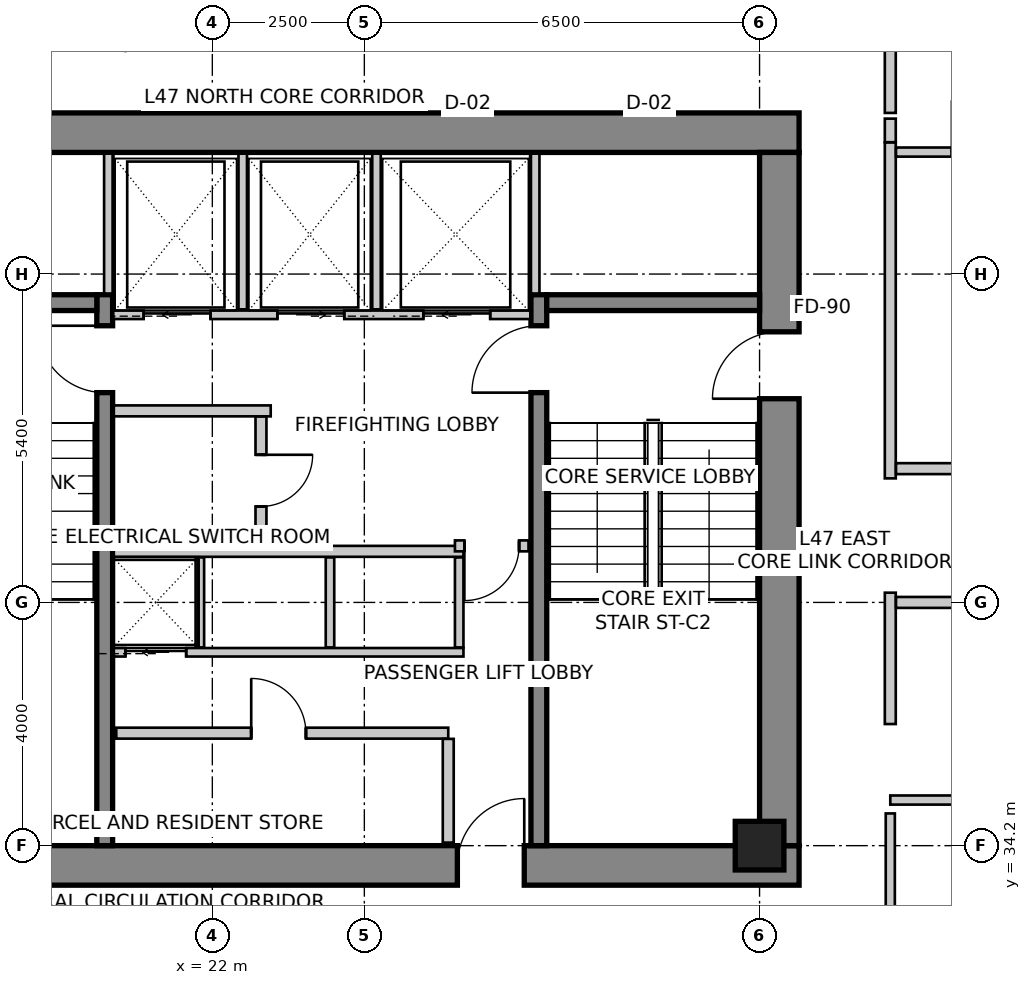
"""IFC4 building model, lengths in metres.
Left out: names, types, materials, properties, quantities, classifications, styles, units other than length and angle.
Written with IfcOpenShell. Run it as: python <this file> out.ifc"""

import sys

from ifc_helpers import new_model, si_unit, direction, frame, frame_2d, origin, origin_2d, place, context, subcontext, project, spatial, rectangle, extrude, source, transform, mapped, element, fill, save


model = new_model("IFC4")
c1 = context("Model", 3, precision=1e-05, world=origin(), true_north=direction((0.0, 1.0)))
c2 = subcontext(c1, "Body", "Model", "MODEL_VIEW")
j1 = project(units=[si_unit("LENGTHUNIT", "METRE"), si_unit("PLANEANGLEUNIT", "RADIAN")], contexts=[c1])
p1 = place(None, origin())
s1 = spatial("IfcSite", under=j1, at=p1, CompositionType="ELEMENT")
p2 = place(p1, origin())
s2 = spatial("IfcBuilding", under=s1, at=p2, CompositionType="ELEMENT")
p3 = place(p2, frame((0.0, 0.0, 190.4)))
s3 = spatial("IfcBuildingStorey", under=s2, at=p3, CompositionType="ELEMENT", Elevation=190.4)
p4 = place(p3, frame((15.95, 45.925, 0.0), z_axis=(0.0, 0.0, 1.0), x_axis=(1.0, 0.0, 0.0)))
e1 = element("IfcWall", 1, at=p4, inside=s3, PredefinedType="SHEAR", context=c2, shape_type="SweptSolid", body=[
    extrude(rectangle(XDim=15.7, YDim=0.65, at=frame_2d((7.85, 0.0))), origin(), (0.0, 0.0, 1.0), 3.5),
])
p5 = place(p3, frame((15.95, 33.875, 0.0), z_axis=(0.0, 0.0, 1.0), x_axis=(1.0, 0.0, 0.0)))
e2 = element("IfcWall", 2, at=p5, inside=s3, PredefinedType="SHEAR", context=c2, shape_type="SweptSolid", body=[
    extrude(rectangle(XDim=15.7, YDim=0.65, at=frame_2d((7.85, 0.0))), origin(), (0.0, 0.0, 1.0), 3.5),
])
m1 = source(origin(), c2, "Body", "SweptSolid", [
    extrude(rectangle(XDim=1.1, YDim=2.15, at=frame_2d((0.55, 1.075))), frame((0.0, 0.335, 0.0), z_axis=(0.0, -1.0, 0.0), x_axis=(1.0, 0.0, 0.0)), (0.0, 0.0, 1.0), 0.67),
])
p6 = place(p5, frame((10.08, 0.0, 0.0)))
e3 = element("IfcOpeningElement", 3, at=p6, cuts=e2, PredefinedType="OPENING", context=c2, shape_type="MappedRepresentation", body=[
    mapped(m1, transform((0.0, 0.0, 0.0), scale=1.0)),
])
p7 = place(p3, frame((31.325, 34.2, 0.0), z_axis=(0.0, 0.0, 1.0), x_axis=(0.0, 1.0, 0.0)))
e4 = element("IfcWall", 4, at=p7, inside=s3, PredefinedType="SHEAR", context=c2, shape_type="SweptSolid", body=[
    extrude(rectangle(XDim=11.4, YDim=0.65, at=frame_2d((5.7, 0.0))), origin(), (0.0, 0.0, 1.0), 3.5),
])
p8 = place(p7, frame((7.35, 0.0, 0.0)))
e5 = element("IfcOpeningElement", 5, at=p8, cuts=e4, PredefinedType="OPENING", context=c2, shape_type="MappedRepresentation", body=[
    mapped(m1, transform((0.0, 0.0, 0.0), scale=1.0)),
])
p9 = place(p3, frame((20.23, 34.2, 0.0), z_axis=(0.0, 0.0, 1.0), x_axis=(0.0, 1.0, 0.0)))
e6 = element("IfcWall", 6, at=p9, inside=s3, PredefinedType="SHEAR", context=c2, shape_type="SweptSolid", body=[
    extrude(rectangle(XDim=9.06, YDim=0.26, at=frame_2d((4.53, 0.0))), origin(), (0.0, 0.0, 1.0), 3.5),
])
m2 = source(origin(), c2, "Body", "SweptSolid", [
    extrude(rectangle(XDim=1.1, YDim=2.15, at=frame_2d((0.55, 1.075))), frame((0.0, 0.14, 0.0), z_axis=(0.0, -1.0, 0.0), x_axis=(1.0, 0.0, 0.0)), (0.0, 0.0, 1.0), 0.28),
])
p10 = place(p9, frame((7.45, 0.0, 0.0)))
e7 = element("IfcOpeningElement", 7, at=p10, cuts=e6, PredefinedType="OPENING", context=c2, shape_type="MappedRepresentation", body=[
    mapped(m2, transform((0.0, 0.0, 0.0), scale=1.0)),
])
p11 = place(p3, frame((27.37, 34.2, 0.0), z_axis=(0.0, 0.0, 1.0), x_axis=(0.0, 1.0, 0.0)))
e8 = element("IfcWall", 8, at=p11, inside=s3, PredefinedType="SHEAR", context=c2, shape_type="SweptSolid", body=[
    extrude(rectangle(XDim=9.06, YDim=0.26, at=frame_2d((4.53, 0.0))), origin(), (0.0, 0.0, 1.0), 3.5),
])
p12 = place(p11, frame((7.45, 0.0, 0.0)))
e9 = element("IfcOpeningElement", 9, at=p12, cuts=e8, PredefinedType="OPENING", context=c2, shape_type="MappedRepresentation", body=[
    mapped(m2, transform((0.0, 0.0, 0.0), scale=1.0)),
])
for number, where, z_axis, x_axis in (
    (10, (16.6, 43.13, 0.0), (0.0, 0.0, 1.0), (1.0, 0.0, 0.0)),
    (11, (27.5, 43.13, 0.0), (0.0, 0.0, 1.0), (1.0, 0.0, 0.0)),
):
    element("IfcWall", number, at=place(p3, frame(where, z_axis=z_axis, x_axis=x_axis)), inside=s3, PredefinedType="SHEAR", context=c2, shape_type="SweptSolid", body=[
        extrude(rectangle(XDim=3.5, YDim=0.26, at=frame_2d((1.75, 0.0))), origin(), (0.0, 0.0, 1.0), 3.5),
    ])
m3 = source(origin(), c2, "Body", "SweptSolid", [
    extrude(rectangle(XDim=0.8, YDim=0.8, at=origin_2d()), origin(), (0.0, 0.0, 1.0), 3.5),
])
p13 = place(p3, frame((31.0, 34.2, 0.0), z_axis=(0.0, 0.0, 1.0), x_axis=(1.0, 0.0, 0.0)))
e12 = element("IfcColumn", 12, at=p13, inside=s3, PredefinedType="COLUMN", context=c2, shape_type="MappedRepresentation", body=[
    mapped(m3, transform((0.0, 0.0, 0.0), scale=1.0)),
])
p14 = place(p3, frame((21.875, 52.742, 0.0), z_axis=(0.0, 0.0, 1.0), x_axis=(-0.843666375448, -0.536867811419, 0.0)))
e13 = element("IfcWall", 13, at=p14, inside=s3, PredefinedType="SOLIDWALL", context=c2, shape_type="SweptSolid", body=[
    extrude(rectangle(XDim=10.284, YDim=0.3, at=frame_2d((5.142, 0.0))), origin(), (0.0, 0.0, 1.0), 3.25),
])
m4 = source(origin(), c2, "Body", "SweptSolid", [
    extrude(rectangle(XDim=2.4, YDim=2.2, at=frame_2d((1.2, 1.1))), frame((0.0, 0.16, 0.0), z_axis=(0.0, -1.0, 0.0), x_axis=(1.0, 0.0, 0.0)), (0.0, 0.0, 1.0), 0.32),
])
p15 = place(p14, frame((3.307, 0.0, 0.85)))
e14 = element("IfcOpeningElement", 14, at=p15, cuts=e13, PredefinedType="OPENING", context=c2, shape_type="MappedRepresentation", body=[
    mapped(m4, transform((0.0, 0.0, 0.0), scale=1.0)),
])
p16 = place(p3, frame((20.37, 42.93, 0.0), z_axis=(0.0, 0.0, 1.0), x_axis=(1.0, 0.0, 0.0)))
e15 = element("IfcWall", 15, at=p16, inside=s3, PredefinedType="SOLIDWALL", context=c2, shape_type="SweptSolid", body=[
    extrude(rectangle(XDim=6.86, YDim=0.14, at=frame_2d((3.43, 0.0))), origin(), (0.0, 0.0, 1.0), 3.25),
])
m5 = source(origin(), c2, "Body", "SweptSolid", [
    extrude(rectangle(XDim=1.1, YDim=2.15, at=frame_2d((0.55, 1.075))), frame((0.0, 0.08, 0.0), z_axis=(0.0, -1.0, 0.0), x_axis=(1.0, 0.0, 0.0)), (0.0, 0.0, 1.0), 0.16),
])
p17 = place(p16, frame((0.5, 0.0, 0.0)))
e16 = element("IfcOpeningElement", 16, at=p17, cuts=e15, PredefinedType="OPENING", context=c2, shape_type="MappedRepresentation", body=[
    mapped(m5, transform((0.0, 0.0, 0.0), scale=1.0)),
])
p18 = place(p16, frame((2.7, 0.0, 0.0)))
e17 = element("IfcOpeningElement", 17, at=p18, cuts=e15, PredefinedType="OPENING", context=c2, shape_type="MappedRepresentation", body=[
    mapped(m5, transform((0.0, 0.0, 0.0), scale=1.0)),
])
p19 = place(p16, frame((5.1, 0.0, 0.0)))
e18 = element("IfcOpeningElement", 18, at=p19, cuts=e15, PredefinedType="OPENING", context=c2, shape_type="MappedRepresentation", body=[
    mapped(m5, transform((0.0, 0.0, 0.0), scale=1.0)),
])
for number, where, z_axis, x_axis in (
    (19, (20.29, 43.28, 0.0), (0.0, 0.0, 1.0), (0.0, 1.0, 0.0)),
    (20, (27.31, 43.28, 0.0), (0.0, 0.0, 1.0), (0.0, 1.0, 0.0)),
):
    element("IfcWall", number, at=place(p3, frame(where, z_axis=z_axis, x_axis=x_axis)), inside=s3, PredefinedType="SOLIDWALL", context=c2, shape_type="SweptSolid", body=[
        extrude(rectangle(XDim=2.3, YDim=0.14, at=frame_2d((1.15, 0.0))), origin(), (0.0, 0.0, 1.0), 3.25),
    ])
for number, where, z_axis, x_axis in (
    (21, (22.5, 43.02, 0.0), (0.0, 0.0, 1.0), (0.0, 1.0, 0.0)),
    (22, (24.7, 43.02, 0.0), (0.0, 0.0, 1.0), (0.0, 1.0, 0.0)),
):
    element("IfcWall", number, at=place(p3, frame(where, z_axis=z_axis, x_axis=x_axis)), inside=s3, PredefinedType="SOLIDWALL", context=c2, shape_type="SweptSolid", body=[
        extrude(rectangle(XDim=2.56, YDim=0.14, at=frame_2d((1.28, 0.0))), origin(), (0.0, 0.0, 1.0), 3.25),
    ])
p20 = place(p3, frame((20.38, 37.38, 0.0), z_axis=(0.0, 0.0, 1.0), x_axis=(1.0, 0.0, 0.0)))
e23 = element("IfcWall", 23, at=p20, inside=s3, PredefinedType="SOLIDWALL", context=c2, shape_type="SweptSolid", body=[
    extrude(rectangle(XDim=5.75, YDim=0.14, at=frame_2d((2.875, 0.0))), origin(), (0.0, 0.0, 1.0), 3.25),
])
m6 = source(origin(), c2, "Body", "SweptSolid", [
    extrude(rectangle(XDim=1.0, YDim=2.15, at=frame_2d((0.5, 1.075))), frame((0.0, 0.08, 0.0), z_axis=(0.0, -1.0, 0.0), x_axis=(1.0, 0.0, 0.0)), (0.0, 0.0, 1.0), 0.16),
])
p21 = place(p20, frame((0.19, 0.0, 0.0)))
e24 = element("IfcOpeningElement", 24, at=p21, cuts=e23, PredefinedType="OPENING", context=c2, shape_type="MappedRepresentation", body=[
    mapped(m6, transform((0.0, 0.0, 0.0), scale=1.0)),
])
p22 = place(p3, frame((20.38, 39.04, 0.0), z_axis=(0.0, 0.0, 1.0), x_axis=(1.0, 0.0, 0.0)))
e25 = element("IfcWall", 25, at=p22, inside=s3, PredefinedType="SOLIDWALL", context=c2, shape_type="SweptSolid", body=[
    extrude(rectangle(XDim=5.75, YDim=0.18, at=frame_2d((2.875, 0.0))), origin(), (0.0, 0.0, 1.0), 3.25),
])
for number, where, z_axis, x_axis in (
    (26, (26.06, 37.46, 0.0), (0.0, 0.0, 1.0), (0.0, 1.0, 0.0)),
    (27, (21.795, 37.46, 0.0), (0.0, 0.0, 1.0), (0.0, 1.0, 0.0)),
    (28, (23.935, 37.46, 0.0), (0.0, 0.0, 1.0), (0.0, 1.0, 0.0)),
):
    element("IfcWall", number, at=place(p3, frame(where, z_axis=z_axis, x_axis=x_axis)), inside=s3, PredefinedType="SOLIDWALL", context=c2, shape_type="SweptSolid", body=[
        extrude(rectangle(XDim=1.48, YDim=0.14, at=frame_2d((0.74, 0.0))), origin(), (0.0, 0.0, 1.0), 3.25),
    ])
p23 = place(p3, frame((22.96, 41.35, 0.0), z_axis=(0.0, 0.0, 1.0), x_axis=(-1.0, 0.0, 0.0)))
e29 = element("IfcWall", 29, at=p23, inside=s3, PredefinedType="PARTITIONING", context=c2, shape_type="SweptSolid", body=[
    extrude(rectangle(XDim=2.58, YDim=0.18, at=frame_2d((1.29, 0.0))), origin(), (0.0, 0.0, 1.0), 3.25),
])
p24 = place(p3, frame((22.8, 41.256, 0.0), z_axis=(0.0, 0.0, 1.0), x_axis=(0.0, -1.0, 0.0)))
e30 = element("IfcWall", 30, at=p24, inside=s3, PredefinedType="PARTITIONING", context=c2, shape_type="SweptSolid", body=[
    extrude(rectangle(XDim=2.106, YDim=0.18, at=frame_2d((1.053, 0.0))), origin(), (0.0, 0.0, 1.0), 3.25),
])
m7 = source(origin(), c2, "Body", "SweptSolid", [
    extrude(rectangle(XDim=0.85, YDim=2.15, at=frame_2d((0.425, 1.075))), frame((0.0, 0.1, 0.0), z_axis=(0.0, -1.0, 0.0), x_axis=(1.0, 0.0, 0.0)), (0.0, 0.0, 1.0), 0.2),
])
p25 = place(p24, frame((0.628, 0.0, 0.0)))
e31 = element("IfcOpeningElement", 31, at=p25, cuts=e30, PredefinedType="OPENING", context=c2, shape_type="MappedRepresentation", body=[
    mapped(m7, transform((0.0, 0.0, 0.0), scale=1.0)),
])
p26 = place(p3, frame((27.2, 39.13, 0.0), z_axis=(0.0, 0.0, 1.0), x_axis=(-1.0, 0.0, 0.0)))
e32 = element("IfcWall", 32, at=p26, inside=s3, PredefinedType="PARTITIONING", context=c2, shape_type="SweptSolid", body=[
    extrude(rectangle(XDim=1.21, YDim=0.18, at=frame_2d((0.605, 0.0))), origin(), (0.0, 0.0, 1.0), 3.25),
])
m8 = source(origin(), c2, "Body", "SweptSolid", [
    extrude(rectangle(XDim=0.9, YDim=2.15, at=frame_2d((0.45, 1.075))), frame((0.0, 0.1, 0.0), z_axis=(0.0, -1.0, 0.0), x_axis=(1.0, 0.0, 0.0)), (0.0, 0.0, 1.0), 0.2),
])
p27 = place(p26, frame((0.155, 0.0, 0.0)))
e33 = element("IfcOpeningElement", 33, at=p27, cuts=e32, PredefinedType="OPENING", context=c2, shape_type="MappedRepresentation", body=[
    mapped(m8, transform((0.0, 0.0, 0.0), scale=1.0)),
])
p28 = place(p3, frame((20.42, 36.05, 0.0), z_axis=(0.0, 0.0, 1.0), x_axis=(1.0, 0.0, 0.0)))
e34 = element("IfcWall", 34, at=p28, inside=s3, PredefinedType="PARTITIONING", context=c2, shape_type="SweptSolid", body=[
    extrude(rectangle(XDim=5.46, YDim=0.18, at=frame_2d((2.73, 0.0))), origin(), (0.0, 0.0, 1.0), 3.25),
])
p29 = place(p28, frame((2.219, 0.0, 0.0)))
e35 = element("IfcOpeningElement", 35, at=p29, cuts=e34, PredefinedType="OPENING", context=c2, shape_type="MappedRepresentation", body=[
    mapped(m8, transform((0.0, 0.0, 0.0), scale=1.0)),
])
p30 = place(p3, frame((25.88, 35.956, 0.0), z_axis=(0.0, 0.0, 1.0), x_axis=(0.0, -1.0, 0.0)))
e36 = element("IfcWall", 36, at=p30, inside=s3, PredefinedType="PARTITIONING", context=c2, shape_type="SweptSolid", body=[
    extrude(rectangle(XDim=1.706, YDim=0.18, at=frame_2d((0.853, 0.0))), origin(), (0.0, 0.0, 1.0), 2.542),
])
p31 = place(p3, frame((33.15, 47.706, 0.0), z_axis=(0.0, 0.0, 1.0), x_axis=(0.0, -1.0, 0.0)))
e37 = element("IfcWall", 37, at=p31, inside=s3, PredefinedType="PARTITIONING", context=c2, shape_type="SweptSolid", body=[
    extrude(rectangle(XDim=1.456, YDim=0.18, at=frame_2d((0.728, 0.0))), origin(), (0.0, 0.0, 1.0), 2.822),
])
p32 = place(p3, frame((33.15, 45.766, 0.0), z_axis=(0.0, 0.0, 1.0), x_axis=(0.0, -1.0, 0.0)))
e38 = element("IfcWall", 38, at=p32, inside=s3, PredefinedType="PARTITIONING", context=c2, shape_type="SweptSolid", body=[
    extrude(rectangle(XDim=5.526, YDim=0.18, at=frame_2d((2.763, 0.0))), origin(), (0.0, 0.0, 1.0), 2.822),
])
p33 = place(p3, frame((33.15, 46.156, 0.0), z_axis=(0.0, 0.0, 1.0), x_axis=(0.0, -1.0, 0.0)))
e39 = element("IfcWall", 39, at=p33, inside=s3, PredefinedType="PARTITIONING", context=c2, shape_type="SweptSolid", body=[
    extrude(rectangle(XDim=0.388, YDim=0.18, at=frame_2d((0.194, 0.0))), origin(), (0.0, 0.0, 1.0), 2.934),
])
p34 = place(p3, frame((33.15, 38.36, 0.0), z_axis=(0.0, 0.0, 1.0), x_axis=(0.0, -1.0, 0.0)))
e40 = element("IfcWall", 40, at=p34, inside=s3, PredefinedType="PARTITIONING", context=c2, shape_type="SweptSolid", body=[
    extrude(rectangle(XDim=2.16, YDim=0.18, at=frame_2d((1.08, 0.0))), origin(), (0.0, 0.0, 1.0), 3.25),
])
p35 = place(p3, frame((33.244, 40.4, 0.0), z_axis=(0.0, 0.0, 1.0), x_axis=(1.0, 0.0, 0.0)))
e41 = element("IfcWall", 41, at=p35, inside=s3, PredefinedType="PARTITIONING", context=c2, shape_type="SweptSolid", body=[
    extrude(rectangle(XDim=9.266, YDim=0.18, at=frame_2d((4.633, 0.0))), origin(), (0.0, 0.0, 1.0), 2.766),
])
p36 = place(p35, frame((2.802, 0.0, 0.0)))
e42 = element("IfcOpeningElement", 42, at=p36, cuts=e41, PredefinedType="OPENING", context=c2, shape_type="MappedRepresentation", body=[
    mapped(m8, transform((0.0, 0.0, 0.0), scale=1.0)),
])
p37 = place(p3, frame((42.51, 38.2, 0.0), z_axis=(0.0, 0.0, 1.0), x_axis=(-1.0, 0.0, 0.0)))
e43 = element("IfcWall", 43, at=p37, inside=s3, PredefinedType="PARTITIONING", context=c2, shape_type="SweptSolid", body=[
    extrude(rectangle(XDim=9.266, YDim=0.18, at=frame_2d((4.633, 0.0))), origin(), (0.0, 0.0, 1.0), 2.766),
])
p38 = place(p37, frame((4.123, 0.0, 0.0)))
e44 = element("IfcOpeningElement", 44, at=p38, cuts=e43, PredefinedType="OPENING", context=c2, shape_type="MappedRepresentation", body=[
    mapped(m8, transform((0.0, 0.0, 0.0), scale=1.0)),
])
p39 = place(p3, frame((33.244, 45.606, 0.0), z_axis=(0.0, 0.0, 1.0), x_axis=(1.0, 0.0, 0.0)))
e45 = element("IfcWall", 45, at=p39, inside=s3, PredefinedType="PARTITIONING", context=c2, shape_type="SweptSolid", body=[
    extrude(rectangle(XDim=2.816, YDim=0.15, at=frame_2d((1.408, 0.0))), origin(), (0.0, 0.0, 1.0), 2.822),
])
m9 = source(origin(), c2, "Body", "SweptSolid", [
    extrude(rectangle(XDim=0.85, YDim=2.15, at=frame_2d((0.425, 1.075))), frame((0.0, 0.085, 0.0), z_axis=(0.0, -1.0, 0.0), x_axis=(1.0, 0.0, 0.0)), (0.0, 0.0, 1.0), 0.17),
])
p40 = place(p39, frame((0.919, 0.0, 0.0)))
e46 = element("IfcOpeningElement", 46, at=p40, cuts=e45, PredefinedType="OPENING", context=c2, shape_type="MappedRepresentation", body=[
    mapped(m9, transform((0.0, 0.0, 0.0), scale=1.0)),
])
p41 = place(p3, frame((36.06, 34.95, 0.0), z_axis=(0.0, 0.0, 1.0), x_axis=(-1.0, 0.0, 0.0)))
e47 = element("IfcWall", 47, at=p41, inside=s3, PredefinedType="PARTITIONING", context=c2, shape_type="SweptSolid", body=[
    extrude(rectangle(XDim=2.91, YDim=0.15, at=frame_2d((1.455, 0.0))), origin(), (0.0, 0.0, 1.0), 3.25),
])
p42 = place(p41, frame((1.03, 0.0, 0.0)))
e48 = element("IfcOpeningElement", 48, at=p42, cuts=e47, PredefinedType="OPENING", context=c2, shape_type="MappedRepresentation", body=[
    mapped(m9, transform((0.0, 0.0, 0.0), scale=1.0)),
])
p43 = place(p3, frame((33.15, 32.409, 0.0), z_axis=(0.0, 0.0, 1.0), x_axis=(0.0, 1.0, 0.0)))
e49 = element("IfcWall", 49, at=p43, inside=s3, PredefinedType="PARTITIONING", context=c2, shape_type="SweptSolid", body=[
    extrude(rectangle(XDim=2.321, YDim=0.15, at=frame_2d((1.161, 0.0))), origin(), (0.0, 0.0, 1.0), 3.25),
])
m10 = source(origin(), c2, "Body", "SweptSolid", [
    extrude(rectangle(XDim=1.1, YDim=2.15, at=frame_2d((0.55, 1.075))), frame((0.0, 0.025, 0.0), z_axis=(0.0, -1.0, 0.0), x_axis=(1.0, 0.0, 0.0)), (0.0, 0.0, 1.0), 0.05),
])
p44 = place(p17, origin())
e50 = element("IfcDoor", 50, at=p44, inside=s3, OperationType="SLIDING_TO_LEFT", PredefinedType="DOOR", context=c2, shape_type="MappedRepresentation", body=[
    mapped(m10, transform((0.0, 0.0, 0.0), scale=1.0)),
])
fill(e16, e50)
p45 = place(p18, origin())
e51 = element("IfcDoor", 51, at=p45, inside=s3, OperationType="SLIDING_TO_RIGHT", PredefinedType="DOOR", context=c2, shape_type="MappedRepresentation", body=[
    mapped(m10, transform((0.0, 0.0, 0.0), scale=1.0)),
])
fill(e17, e51)
m11 = source(origin(), c2, "Body", "SweptSolid", [
    extrude(rectangle(XDim=1.1, YDim=2.15, at=frame_2d((0.55, 1.075))), frame((0.0, 0.025, 0.0), z_axis=(0.0, -1.0, 0.0), x_axis=(1.0, 0.0, 0.0)), (0.0, 0.0, 1.0), 0.05),
])
p46 = place(p19, origin())
e52 = element("IfcDoor", 52, at=p46, inside=s3, OperationType="SLIDING_TO_LEFT", PredefinedType="DOOR", context=c2, shape_type="MappedRepresentation", body=[
    mapped(m11, transform((0.0, 0.0, 0.0), scale=1.0)),
])
fill(e18, e52)
m12 = source(origin(), c2, "Body", "SweptSolid", [
    extrude(rectangle(XDim=1.0, YDim=2.15, at=frame_2d((0.5, 1.075))), frame((0.0, 0.025, 0.0), z_axis=(0.0, -1.0, 0.0), x_axis=(1.0, 0.0, 0.0)), (0.0, 0.0, 1.0), 0.05),
])
p47 = place(p21, origin())
e53 = element("IfcDoor", 53, at=p47, inside=s3, OperationType="SLIDING_TO_LEFT", PredefinedType="DOOR", context=c2, shape_type="MappedRepresentation", body=[
    mapped(m12, transform((0.0, 0.0, 0.0), scale=1.0)),
])
fill(e24, e53)
m13 = source(origin(), c2, "Body", "SweptSolid", [
    extrude(rectangle(XDim=1.1, YDim=2.15, at=frame_2d((0.55, 1.075))), frame((0.0, 0.025, 0.0), z_axis=(0.0, -1.0, 0.0), x_axis=(1.0, 0.0, 0.0)), (0.0, 0.0, 1.0), 0.05),
])
p48 = place(p10, origin())
e54 = element("IfcDoor", 54, at=p48, inside=s3, OperationType="SINGLE_SWING_RIGHT", PredefinedType="DOOR", context=c2, shape_type="MappedRepresentation", body=[
    mapped(m13, transform((0.0, 0.0, 0.0), scale=1.0)),
])
fill(e7, e54)
p49 = place(p12, origin())
e55 = element("IfcDoor", 55, at=p49, inside=s3, OperationType="SINGLE_SWING_LEFT", PredefinedType="DOOR", context=c2, shape_type="MappedRepresentation", body=[
    mapped(m13, transform((0.0, 0.0, 0.0), scale=1.0)),
])
fill(e9, e55)
p50 = place(p8, origin())
e56 = element("IfcDoor", 56, at=p50, inside=s3, OperationType="SINGLE_SWING_LEFT", PredefinedType="DOOR", context=c2, shape_type="MappedRepresentation", body=[
    mapped(m13, transform((0.0, 0.0, 0.0), scale=1.0)),
])
fill(e5, e56)
p51 = place(p6, origin())
e57 = element("IfcDoor", 57, at=p51, inside=s3, OperationType="SINGLE_SWING_RIGHT", PredefinedType="DOOR", context=c2, shape_type="MappedRepresentation", body=[
    mapped(m13, transform((0.0, 0.0, 0.0), scale=1.0)),
])
fill(e3, e57)
m14 = source(origin(), c2, "Body", "SweptSolid", [
    extrude(rectangle(XDim=0.85, YDim=2.15, at=frame_2d((0.425, 1.075))), frame((0.0, 0.025, 0.0), z_axis=(0.0, -1.0, 0.0), x_axis=(1.0, 0.0, 0.0)), (0.0, 0.0, 1.0), 0.05),
])
p52 = place(p25, origin())
e58 = element("IfcDoor", 58, at=p52, inside=s3, OperationType="SINGLE_SWING_LEFT", PredefinedType="DOOR", context=c2, shape_type="MappedRepresentation", body=[
    mapped(m14, transform((0.0, 0.0, 0.0), scale=1.0)),
])
fill(e31, e58)
m15 = source(origin(), c2, "Body", "SweptSolid", [
    extrude(rectangle(XDim=0.9, YDim=2.15, at=frame_2d((0.45, 1.075))), frame((0.0, 0.025, 0.0), z_axis=(0.0, -1.0, 0.0), x_axis=(1.0, 0.0, 0.0)), (0.0, 0.0, 1.0), 0.05),
])
p53 = place(p27, origin())
e59 = element("IfcDoor", 59, at=p53, inside=s3, OperationType="SINGLE_SWING_RIGHT", PredefinedType="DOOR", context=c2, shape_type="MappedRepresentation", body=[
    mapped(m15, transform((0.0, 0.0, 0.0), scale=1.0)),
])
fill(e33, e59)
p54 = place(p29, origin())
e60 = element("IfcDoor", 60, at=p54, inside=s3, OperationType="SINGLE_SWING_LEFT", PredefinedType="DOOR", context=c2, shape_type="MappedRepresentation", body=[
    mapped(m15, transform((0.0, 0.0, 0.0), scale=1.0)),
])
fill(e35, e60)
save(model, sys.argv[1])
